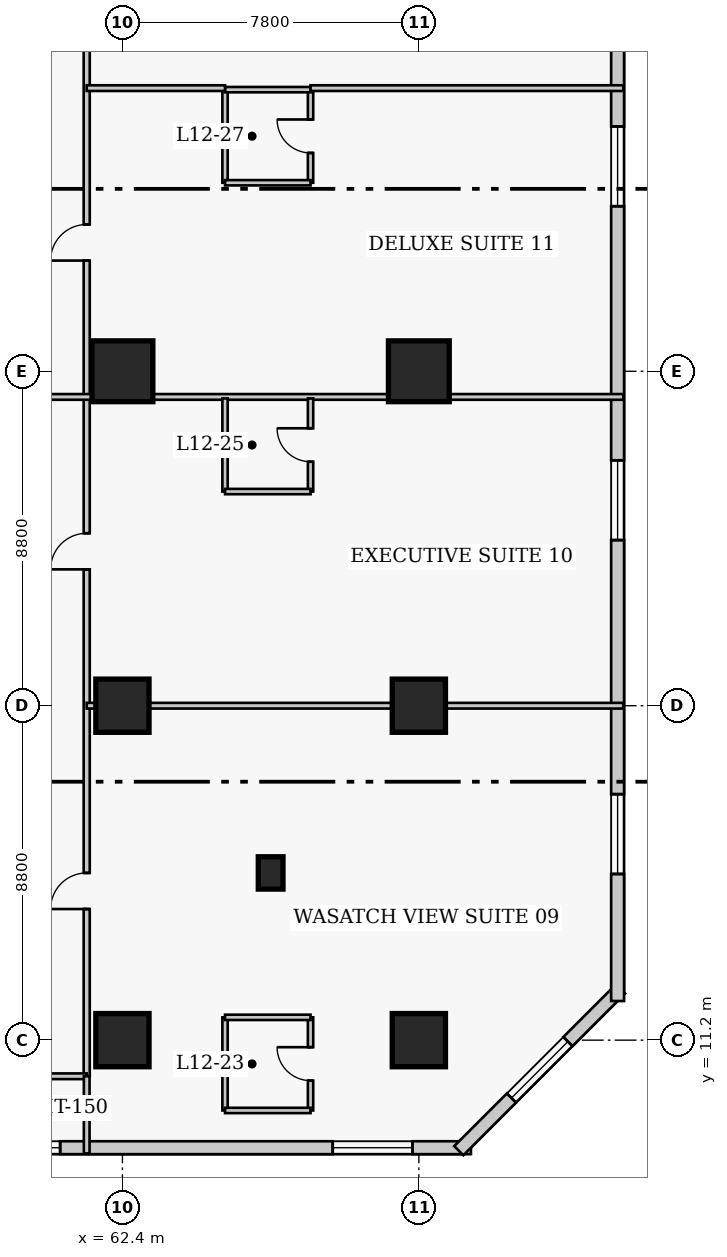
"""IFC4 building model, lengths in metres.
Left out: names, types, materials, properties, quantities, classifications, styles, units other than length and angle.
Written with IfcOpenShell. Run it as: python <this file> out.ifc"""

import sys

from ifc_helpers import new_model, si_unit, direction, frame, frame_2d, origin, origin_2d, place, context, subcontext, project, spatial, rectangle, extrude, element, fill, save


model = new_model("IFC4")
c1 = context("Model", 3, precision=1e-05, world=origin(), true_north=direction((0.0, 1.0)))
c2 = subcontext(c1, "Body", "Model", "MODEL_VIEW")
j1 = project(units=[si_unit("LENGTHUNIT", "METRE"), si_unit("PLANEANGLEUNIT", "RADIAN")], contexts=[c1])
p1 = place(None, origin())
s1 = spatial("IfcSite", under=j1, at=p1, CompositionType="ELEMENT")
p2 = place(p1, origin())
s2 = spatial("IfcBuilding", under=s1, at=p2, CompositionType="ELEMENT")
p3 = place(p2, frame((0.0, 0.0, 52.6)))
s3 = spatial("IfcBuildingStorey", under=s2, at=p3, CompositionType="ELEMENT", Elevation=52.6)
for number, where, z_axis, x_axis in (
    (1, (62.4, 11.2, 0.0), (0.0, 0.0, 1.0), (1.0, 0.0, 0.0)),
    (2, (62.4, 20.0, 0.0), (0.0, 0.0, 1.0), (1.0, 0.0, 0.0)),
):
    element("IfcColumn", number, at=place(p3, frame(where, z_axis=z_axis, x_axis=x_axis)), inside=s3, PredefinedType="COLUMN", context=c2, shape_type="SweptSolid", body=[
        extrude(rectangle(XDim=1.4, YDim=1.4, at=origin_2d()), origin(), (0.0, 0.0, 1.0), 3.8),
    ])
p4 = place(p3, frame((62.4, 28.8, 0.0), z_axis=(0.0, 0.0, 1.0), x_axis=(1.0, 0.0, 0.0)))
e3 = element("IfcColumn", 3, at=p4, inside=s3, PredefinedType="COLUMN", context=c2, shape_type="SweptSolid", body=[
    extrude(rectangle(XDim=1.6, YDim=1.6, at=origin_2d()), origin(), (0.0, 0.0, 1.0), 3.8),
])
for number, where, z_axis, x_axis in (
    (4, (70.2, 11.2, 0.0), (0.0, 0.0, 1.0), (1.0, 0.0, 0.0)),
    (5, (70.2, 20.0, 0.0), (0.0, 0.0, 1.0), (1.0, 0.0, 0.0)),
):
    element("IfcColumn", number, at=place(p3, frame(where, z_axis=z_axis, x_axis=x_axis)), inside=s3, PredefinedType="COLUMN", context=c2, shape_type="SweptSolid", body=[
        extrude(rectangle(XDim=1.4, YDim=1.4, at=origin_2d()), origin(), (0.0, 0.0, 1.0), 3.8),
    ])
p5 = place(p3, frame((70.2, 28.8, 0.0), z_axis=(0.0, 0.0, 1.0), x_axis=(1.0, 0.0, 0.0)))
e6 = element("IfcColumn", 6, at=p5, inside=s3, PredefinedType="COLUMN", context=c2, shape_type="SweptSolid", body=[
    extrude(rectangle(XDim=1.6, YDim=1.6, at=origin_2d()), origin(), (0.0, 0.0, 1.0), 3.8),
])
p6 = place(p3, frame((66.3, 15.6, 0.0), z_axis=(0.0, 0.0, 1.0), x_axis=(1.0, 0.0, 0.0)))
e7 = element("IfcColumn", 7, at=p6, inside=s3, PredefinedType="PILASTER", context=c2, shape_type="SweptSolid", body=[
    extrude(rectangle(XDim=0.65, YDim=0.85, at=origin_2d()), origin(), (0.0, 0.0, 1.0), 3.8),
])
p7 = place(p3, frame((41.68, 8.37, 0.0), z_axis=(0.0, 0.0, 1.0), x_axis=(1.0, 0.0, 0.0)))
e8 = element("IfcWall", 8, at=p7, inside=s3, PredefinedType="SOLIDWALL", context=c2, shape_type="SweptSolid", body=[
    extrude(rectangle(XDim=29.89, YDim=0.34, at=frame_2d((14.945, 0.0))), origin(), (0.0, 0.0, 1.0), 3.54),
])
p8 = place(p7, frame((2.036, 0.0, 0.85)))
e9 = element("IfcOpeningElement", 9, at=p8, cuts=e8, PredefinedType="OPENING", context=c2, shape_type="SweptSolid", body=[
    extrude(rectangle(XDim=2.1, YDim=1.85, at=frame_2d((1.05, 0.925))), frame((0.0, 0.18, 0.0), z_axis=(0.0, -1.0, 0.0), x_axis=(1.0, 0.0, 0.0)), (0.0, 0.0, 1.0), 0.36),
])
p9 = place(p7, frame((9.509, 0.0, 0.85)))
e10 = element("IfcOpeningElement", 10, at=p9, cuts=e8, PredefinedType="OPENING", context=c2, shape_type="SweptSolid", body=[
    extrude(rectangle(XDim=2.1, YDim=1.85, at=frame_2d((1.05, 0.925))), frame((0.0, 0.18, 0.0), z_axis=(0.0, -1.0, 0.0), x_axis=(1.0, 0.0, 0.0)), (0.0, 0.0, 1.0), 0.36),
])
p10 = place(p7, frame((16.981, 0.0, 0.85)))
e11 = element("IfcOpeningElement", 11, at=p10, cuts=e8, PredefinedType="OPENING", context=c2, shape_type="SweptSolid", body=[
    extrude(rectangle(XDim=2.1, YDim=1.85, at=frame_2d((1.05, 0.925))), frame((0.0, 0.18, 0.0), z_axis=(0.0, -1.0, 0.0), x_axis=(1.0, 0.0, 0.0)), (0.0, 0.0, 1.0), 0.36),
])
p11 = place(p7, frame((26.254, 0.0, 0.85)))
e12 = element("IfcOpeningElement", 12, at=p11, cuts=e8, PredefinedType="OPENING", context=c2, shape_type="SweptSolid", body=[
    extrude(rectangle(XDim=2.1, YDim=1.85, at=frame_2d((1.05, 0.925))), frame((0.0, 0.18, 0.0), z_axis=(0.0, -1.0, 0.0), x_axis=(1.0, 0.0, 0.0)), (0.0, 0.0, 1.0), 0.36),
])
p12 = place(p7, frame((14.265, 0.0, 0.85)))
e13 = element("IfcOpeningElement", 13, at=p12, cuts=e8, PredefinedType="OPENING", context=c2, shape_type="SweptSolid", body=[
    extrude(rectangle(XDim=1.3, YDim=1.7, at=frame_2d((0.65, 0.85))), frame((0.0, 0.18, 0.0), z_axis=(0.0, -1.0, 0.0), x_axis=(1.0, 0.0, 0.0)), (0.0, 0.0, 1.0), 0.36),
])
p13 = place(p3, frame((71.251, 8.292, 0.0), z_axis=(0.0, 0.0, 1.0), x_axis=(0.707106781187, 0.707106781187, 0.0)))
e14 = element("IfcWall", 14, at=p13, inside=s3, PredefinedType="SOLIDWALL", context=c2, shape_type="SweptSolid", body=[
    extrude(rectangle(XDim=6.02, YDim=0.34, at=frame_2d((3.01, 0.0))), origin(), (0.0, 0.0, 1.0), 3.54),
])
p14 = place(p13, frame((1.96, 0.0, 0.85)))
e15 = element("IfcOpeningElement", 15, at=p14, cuts=e14, PredefinedType="OPENING", context=c2, shape_type="SweptSolid", body=[
    extrude(rectangle(XDim=2.1, YDim=1.85, at=frame_2d((1.05, 0.925))), frame((0.0, 0.18, 0.0), z_axis=(0.0, -1.0, 0.0), x_axis=(1.0, 0.0, 0.0)), (0.0, 0.0, 1.0), 0.36),
])
p15 = place(p3, frame((75.43, 12.23, 0.0), z_axis=(0.0, 0.0, 1.0), x_axis=(0.0, 1.0, 0.0)))
e16 = element("IfcWall", 16, at=p15, inside=s3, PredefinedType="SOLIDWALL", context=c2, shape_type="SweptSolid", body=[
    extrude(rectangle(XDim=35.14, YDim=0.34, at=frame_2d((17.57, 0.0))), origin(), (0.0, 0.0, 1.0), 3.54),
])
p16 = place(p15, frame((3.343, 0.0, 0.85)))
e17 = element("IfcOpeningElement", 17, at=p16, cuts=e16, PredefinedType="OPENING", context=c2, shape_type="SweptSolid", body=[
    extrude(rectangle(XDim=2.1, YDim=1.85, at=frame_2d((1.05, 0.925))), frame((0.0, 0.18, 0.0), z_axis=(0.0, -1.0, 0.0), x_axis=(1.0, 0.0, 0.0)), (0.0, 0.0, 1.0), 0.36),
])
p17 = place(p15, frame((12.127, 0.0, 0.85)))
e18 = element("IfcOpeningElement", 18, at=p17, cuts=e16, PredefinedType="OPENING", context=c2, shape_type="SweptSolid", body=[
    extrude(rectangle(XDim=2.1, YDim=1.85, at=frame_2d((1.05, 0.925))), frame((0.0, 0.18, 0.0), z_axis=(0.0, -1.0, 0.0), x_axis=(1.0, 0.0, 0.0)), (0.0, 0.0, 1.0), 0.36),
])
p18 = place(p15, frame((20.913, 0.0, 0.85)))
e19 = element("IfcOpeningElement", 19, at=p18, cuts=e16, PredefinedType="OPENING", context=c2, shape_type="SweptSolid", body=[
    extrude(rectangle(XDim=2.1, YDim=1.85, at=frame_2d((1.05, 0.925))), frame((0.0, 0.18, 0.0), z_axis=(0.0, -1.0, 0.0), x_axis=(1.0, 0.0, 0.0)), (0.0, 0.0, 1.0), 0.36),
])
p19 = place(p15, frame((29.698, 0.0, 0.85)))
e20 = element("IfcOpeningElement", 20, at=p19, cuts=e16, PredefinedType="OPENING", context=c2, shape_type="SweptSolid", body=[
    extrude(rectangle(XDim=2.1, YDim=1.85, at=frame_2d((1.05, 0.925))), frame((0.0, 0.18, 0.0), z_axis=(0.0, -1.0, 0.0), x_axis=(1.0, 0.0, 0.0)), (0.0, 0.0, 1.0), 0.36),
])
p20 = place(p3, frame((61.46, 10.25, 0.0), z_axis=(0.0, 0.0, 1.0), x_axis=(0.0, 1.0, 0.0)))
e21 = element("IfcWall", 21, at=p20, inside=s3, PredefinedType="PARTITIONING", context=c2, shape_type="SweptSolid", body=[
    extrude(rectangle(XDim=30.4, YDim=0.16, at=frame_2d((15.2, 0.0))), origin(), (0.0, 0.0, 1.0), 3.54),
])
p21 = place(p20, frame((4.4, 0.0, 0.0)))
e22 = element("IfcOpeningElement", 22, at=p21, cuts=e21, PredefinedType="OPENING", context=c2, shape_type="SweptSolid", body=[
    extrude(rectangle(XDim=0.95, YDim=2.1, at=frame_2d((0.475, 1.05))), frame((0.0, 0.09, 0.0), z_axis=(0.0, -1.0, 0.0), x_axis=(1.0, 0.0, 0.0)), (0.0, 0.0, 1.0), 0.18),
])
p22 = place(p20, frame((13.337, 0.0, 0.0)))
e23 = element("IfcOpeningElement", 23, at=p22, cuts=e21, PredefinedType="OPENING", context=c2, shape_type="SweptSolid", body=[
    extrude(rectangle(XDim=0.95, YDim=2.1, at=frame_2d((0.475, 1.05))), frame((0.0, 0.09, 0.0), z_axis=(0.0, -1.0, 0.0), x_axis=(1.0, 0.0, 0.0)), (0.0, 0.0, 1.0), 0.18),
])
p23 = place(p20, frame((21.462, 0.0, 0.0)))
e24 = element("IfcOpeningElement", 24, at=p23, cuts=e21, PredefinedType="OPENING", context=c2, shape_type="SweptSolid", body=[
    extrude(rectangle(XDim=0.95, YDim=2.1, at=frame_2d((0.475, 1.05))), frame((0.0, 0.09, 0.0), z_axis=(0.0, -1.0, 0.0), x_axis=(1.0, 0.0, 0.0)), (0.0, 0.0, 1.0), 0.18),
])
p24 = place(p20, frame((28.96, 0.0, 0.0)))
e25 = element("IfcOpeningElement", 25, at=p24, cuts=e21, PredefinedType="OPENING", context=c2, shape_type="SweptSolid", body=[
    extrude(rectangle(XDim=1.0, YDim=2.15, at=frame_2d((0.5, 1.075))), frame((0.0, 0.09, 0.0), z_axis=(0.0, -1.0, 0.0), x_axis=(1.0, 0.0, 0.0)), (0.0, 0.0, 1.0), 0.18),
])
p25 = place(p3, frame((59.24, 10.25, 0.0), z_axis=(0.0, 0.0, 1.0), x_axis=(1.0, 0.0, 0.0)))
e26 = element("IfcWall", 26, at=p25, inside=s3, PredefinedType="PARTITIONING", context=c2, shape_type="SweptSolid", body=[
    extrude(rectangle(XDim=2.22, YDim=0.15, at=frame_2d((1.11, 0.0))), origin(), (0.0, 0.0, 1.0), 3.54),
])
p26 = place(p3, frame((61.46, 8.22, 0.0), z_axis=(0.0, 0.0, 1.0), x_axis=(0.0, 1.0, 0.0)))
e27 = element("IfcWall", 27, at=p26, inside=s3, PredefinedType="PARTITIONING", context=c2, shape_type="SweptSolid", body=[
    extrude(rectangle(XDim=2.03, YDim=0.15, at=frame_2d((1.015, 0.0))), origin(), (0.0, 0.0, 1.0), 3.54),
])
p27 = place(p3, frame((65.1, 9.35, 0.0), z_axis=(0.0, 0.0, 1.0), x_axis=(0.0, 1.0, 0.0)))
e28 = element("IfcWall", 28, at=p27, inside=s3, PredefinedType="PLUMBINGWALL", context=c2, shape_type="SweptSolid", body=[
    extrude(rectangle(XDim=2.45, YDim=0.14, at=frame_2d((1.225, 0.0))), origin(), (0.0, 0.0, 1.0), 3.54),
])
p28 = place(p3, frame((67.35, 9.35, 0.0), z_axis=(0.0, 0.0, 1.0), x_axis=(0.0, 1.0, 0.0)))
e29 = element("IfcWall", 29, at=p28, inside=s3, PredefinedType="PLUMBINGWALL", context=c2, shape_type="SweptSolid", body=[
    extrude(rectangle(XDim=2.45, YDim=0.14, at=frame_2d((1.225, 0.0))), origin(), (0.0, 0.0, 1.0), 3.54),
])
p29 = place(p28, frame((0.785, 0.0, 0.0)))
e30 = element("IfcOpeningElement", 30, at=p29, cuts=e29, PredefinedType="OPENING", context=c2, shape_type="SweptSolid", body=[
    extrude(rectangle(XDim=0.88, YDim=2.05, at=frame_2d((0.44, 1.025))), frame((0.0, 0.08, 0.0), z_axis=(0.0, -1.0, 0.0), x_axis=(1.0, 0.0, 0.0)), (0.0, 0.0, 1.0), 0.16),
])
for number, where, z_axis, x_axis in (
    (31, (65.1, 9.35, 0.0), (0.0, 0.0, 1.0), (1.0, 0.0, 0.0)),
    (32, (65.1, 11.8, 0.0), (0.0, 0.0, 1.0), (1.0, 0.0, 0.0)),
):
    element("IfcWall", number, at=place(p3, frame(where, z_axis=z_axis, x_axis=x_axis)), inside=s3, PredefinedType="PLUMBINGWALL", context=c2, shape_type="SweptSolid", body=[
        extrude(rectangle(XDim=2.25, YDim=0.14, at=frame_2d((1.125, 0.0))), origin(), (0.0, 0.0, 1.0), 3.54),
    ])
p30 = place(p3, frame((61.46, 20.0, 0.0), z_axis=(0.0, 0.0, 1.0), x_axis=(1.0, 0.0, 0.0)))
e33 = element("IfcWall", 33, at=p30, inside=s3, PredefinedType="PARTITIONING", context=c2, shape_type="SweptSolid", body=[
    extrude(rectangle(XDim=14.12, YDim=0.15, at=frame_2d((7.06, 0.0))), origin(), (0.0, 0.0, 1.0), 2.593),
])
p31 = place(p3, frame((59.51, 28.125, 0.0), z_axis=(0.0, 0.0, 1.0), x_axis=(1.0, 0.0, 0.0)))
e34 = element("IfcWall", 34, at=p31, inside=s3, PredefinedType="PARTITIONING", context=c2, shape_type="SweptSolid", body=[
    extrude(rectangle(XDim=16.07, YDim=0.15, at=frame_2d((8.035, 0.0))), origin(), (0.0, 0.0, 1.0), 3.54),
])
p32 = place(p3, frame((65.1, 25.635, 0.0), z_axis=(0.0, 0.0, 1.0), x_axis=(0.0, 1.0, 0.0)))
e35 = element("IfcWall", 35, at=p32, inside=s3, PredefinedType="PLUMBINGWALL", context=c2, shape_type="SweptSolid", body=[
    extrude(rectangle(XDim=2.45, YDim=0.14, at=frame_2d((1.225, 0.0))), origin(), (0.0, 0.0, 1.0), 3.54),
])
p33 = place(p3, frame((67.35, 25.635, 0.0), z_axis=(0.0, 0.0, 1.0), x_axis=(0.0, 1.0, 0.0)))
e36 = element("IfcWall", 36, at=p33, inside=s3, PredefinedType="PLUMBINGWALL", context=c2, shape_type="SweptSolid", body=[
    extrude(rectangle(XDim=2.45, YDim=0.14, at=frame_2d((1.225, 0.0))), origin(), (0.0, 0.0, 1.0), 3.54),
])
p34 = place(p33, frame((0.785, 0.0, 0.0)))
e37 = element("IfcOpeningElement", 37, at=p34, cuts=e36, PredefinedType="OPENING", context=c2, shape_type="SweptSolid", body=[
    extrude(rectangle(XDim=0.88, YDim=2.05, at=frame_2d((0.44, 1.025))), frame((0.0, 0.08, 0.0), z_axis=(0.0, -1.0, 0.0), x_axis=(1.0, 0.0, 0.0)), (0.0, 0.0, 1.0), 0.16),
])
p35 = place(p3, frame((65.1, 25.635, 0.0), z_axis=(0.0, 0.0, 1.0), x_axis=(1.0, 0.0, 0.0)))
e38 = element("IfcWall", 38, at=p35, inside=s3, PredefinedType="PLUMBINGWALL", context=c2, shape_type="SweptSolid", body=[
    extrude(rectangle(XDim=2.25, YDim=0.14, at=frame_2d((1.125, 0.0))), origin(), (0.0, 0.0, 1.0), 3.54),
])
p36 = place(p3, frame((65.1, 33.76, 0.0), z_axis=(0.0, 0.0, 1.0), x_axis=(0.0, 1.0, 0.0)))
e39 = element("IfcWall", 39, at=p36, inside=s3, PredefinedType="PLUMBINGWALL", context=c2, shape_type="SweptSolid", body=[
    extrude(rectangle(XDim=2.45, YDim=0.14, at=frame_2d((1.225, 0.0))), origin(), (0.0, 0.0, 1.0), 3.54),
])
p37 = place(p3, frame((67.35, 33.76, 0.0), z_axis=(0.0, 0.0, 1.0), x_axis=(0.0, 1.0, 0.0)))
e40 = element("IfcWall", 40, at=p37, inside=s3, PredefinedType="PLUMBINGWALL", context=c2, shape_type="SweptSolid", body=[
    extrude(rectangle(XDim=2.45, YDim=0.14, at=frame_2d((1.225, 0.0))), origin(), (0.0, 0.0, 1.0), 3.54),
])
p38 = place(p37, frame((0.785, 0.0, 0.0)))
e41 = element("IfcOpeningElement", 41, at=p38, cuts=e40, PredefinedType="OPENING", context=c2, shape_type="SweptSolid", body=[
    extrude(rectangle(XDim=0.88, YDim=2.05, at=frame_2d((0.44, 1.025))), frame((0.0, 0.08, 0.0), z_axis=(0.0, -1.0, 0.0), x_axis=(1.0, 0.0, 0.0)), (0.0, 0.0, 1.0), 0.16),
])
for number, where, z_axis, x_axis in (
    (42, (65.1, 33.76, 0.0), (0.0, 0.0, 1.0), (1.0, 0.0, 0.0)),
    (43, (65.1, 36.21, 0.0), (0.0, 0.0, 1.0), (1.0, 0.0, 0.0)),
):
    element("IfcWall", number, at=place(p3, frame(where, z_axis=z_axis, x_axis=x_axis)), inside=s3, PredefinedType="PLUMBINGWALL", context=c2, shape_type="SweptSolid", body=[
        extrude(rectangle(XDim=2.25, YDim=0.14, at=frame_2d((1.125, 0.0))), origin(), (0.0, 0.0, 1.0), 3.54),
    ])
p39 = place(p3, frame((61.46, 36.25, 0.0), z_axis=(0.0, 0.0, 1.0), x_axis=(1.0, 0.0, 0.0)))
e44 = element("IfcWall", 44, at=p39, inside=s3, PredefinedType="PARTITIONING", context=c2, shape_type="SweptSolid", body=[
    extrude(rectangle(XDim=3.64, YDim=0.15, at=frame_2d((1.82, 0.0))), origin(), (0.0, 0.0, 1.0), 3.54),
])
p40 = place(p3, frame((67.35, 36.25, 0.0), z_axis=(0.0, 0.0, 1.0), x_axis=(1.0, 0.0, 0.0)))
e45 = element("IfcWall", 45, at=p40, inside=s3, PredefinedType="PARTITIONING", context=c2, shape_type="SweptSolid", body=[
    extrude(rectangle(XDim=8.23, YDim=0.15, at=frame_2d((4.115, 0.0))), origin(), (0.0, 0.0, 1.0), 3.54),
])
p41 = place(p10, origin())
e46 = element("IfcWindow", 46, at=p41, inside=s3, PartitioningType="SINGLE_PANEL", PredefinedType="WINDOW", context=c2, shape_type="SweptSolid", body=[
    extrude(rectangle(XDim=2.1, YDim=1.85, at=frame_2d((1.05, 0.925))), frame((0.0, 0.03, 0.0), z_axis=(0.0, -1.0, 0.0), x_axis=(1.0, 0.0, 0.0)), (0.0, 0.0, 1.0), 0.06),
])
fill(e11, e46)
p42 = place(p11, origin())
e47 = element("IfcWindow", 47, at=p42, inside=s3, PartitioningType="SINGLE_PANEL", PredefinedType="WINDOW", context=c2, shape_type="SweptSolid", body=[
    extrude(rectangle(XDim=2.1, YDim=1.85, at=frame_2d((1.05, 0.925))), frame((0.0, 0.03, 0.0), z_axis=(0.0, -1.0, 0.0), x_axis=(1.0, 0.0, 0.0)), (0.0, 0.0, 1.0), 0.06),
])
fill(e12, e47)
p43 = place(p14, origin())
e48 = element("IfcWindow", 48, at=p43, inside=s3, PartitioningType="SINGLE_PANEL", PredefinedType="WINDOW", context=c2, shape_type="SweptSolid", body=[
    extrude(rectangle(XDim=2.1, YDim=1.85, at=frame_2d((1.05, 0.925))), frame((0.0, 0.03, 0.0), z_axis=(0.0, -1.0, 0.0), x_axis=(1.0, 0.0, 0.0)), (0.0, 0.0, 1.0), 0.06),
])
fill(e15, e48)
p44 = place(p16, origin())
e49 = element("IfcWindow", 49, at=p44, inside=s3, PartitioningType="SINGLE_PANEL", PredefinedType="WINDOW", context=c2, shape_type="SweptSolid", body=[
    extrude(rectangle(XDim=2.1, YDim=1.85, at=frame_2d((1.05, 0.925))), frame((0.0, 0.03, 0.0), z_axis=(0.0, -1.0, 0.0), x_axis=(1.0, 0.0, 0.0)), (0.0, 0.0, 1.0), 0.06),
])
fill(e17, e49)
p45 = place(p17, origin())
e50 = element("IfcWindow", 50, at=p45, inside=s3, PartitioningType="SINGLE_PANEL", PredefinedType="WINDOW", context=c2, shape_type="SweptSolid", body=[
    extrude(rectangle(XDim=2.1, YDim=1.85, at=frame_2d((1.05, 0.925))), frame((0.0, 0.03, 0.0), z_axis=(0.0, -1.0, 0.0), x_axis=(1.0, 0.0, 0.0)), (0.0, 0.0, 1.0), 0.06),
])
fill(e18, e50)
p46 = place(p18, origin())
e51 = element("IfcWindow", 51, at=p46, inside=s3, PartitioningType="SINGLE_PANEL", PredefinedType="WINDOW", context=c2, shape_type="SweptSolid", body=[
    extrude(rectangle(XDim=2.1, YDim=1.85, at=frame_2d((1.05, 0.925))), frame((0.0, 0.03, 0.0), z_axis=(0.0, -1.0, 0.0), x_axis=(1.0, 0.0, 0.0)), (0.0, 0.0, 1.0), 0.06),
])
fill(e19, e51)
p47 = place(p29, origin())
e52 = element("IfcDoor", 52, at=p47, inside=s3, OperationType="SINGLE_SWING_RIGHT", PredefinedType="DOOR", context=c2, shape_type="SweptSolid", body=[
    extrude(rectangle(XDim=0.88, YDim=2.05, at=frame_2d((0.44, 1.025))), frame((0.0, 0.025, 0.0), z_axis=(0.0, -1.0, 0.0), x_axis=(1.0, 0.0, 0.0)), (0.0, 0.0, 1.0), 0.05),
])
fill(e30, e52)
p48 = place(p21, origin())
e53 = element("IfcDoor", 53, at=p48, inside=s3, OperationType="SINGLE_SWING_LEFT", PredefinedType="DOOR", context=c2, shape_type="SweptSolid", body=[
    extrude(rectangle(XDim=0.95, YDim=2.1, at=frame_2d((0.475, 1.05))), frame((0.0, 0.025, 0.0), z_axis=(0.0, -1.0, 0.0), x_axis=(1.0, 0.0, 0.0)), (0.0, 0.0, 1.0), 0.05),
])
fill(e22, e53)
p49 = place(p34, origin())
e54 = element("IfcDoor", 54, at=p49, inside=s3, OperationType="SINGLE_SWING_RIGHT", PredefinedType="DOOR", context=c2, shape_type="SweptSolid", body=[
    extrude(rectangle(XDim=0.88, YDim=2.05, at=frame_2d((0.44, 1.025))), frame((0.0, 0.025, 0.0), z_axis=(0.0, -1.0, 0.0), x_axis=(1.0, 0.0, 0.0)), (0.0, 0.0, 1.0), 0.05),
])
fill(e37, e54)
p50 = place(p22, origin())
e55 = element("IfcDoor", 55, at=p50, inside=s3, OperationType="SINGLE_SWING_LEFT", PredefinedType="DOOR", context=c2, shape_type="SweptSolid", body=[
    extrude(rectangle(XDim=0.95, YDim=2.1, at=frame_2d((0.475, 1.05))), frame((0.0, 0.025, 0.0), z_axis=(0.0, -1.0, 0.0), x_axis=(1.0, 0.0, 0.0)), (0.0, 0.0, 1.0), 0.05),
])
fill(e23, e55)
p51 = place(p38, origin())
e56 = element("IfcDoor", 56, at=p51, inside=s3, OperationType="SINGLE_SWING_RIGHT", PredefinedType="DOOR", context=c2, shape_type="SweptSolid", body=[
    extrude(rectangle(XDim=0.88, YDim=2.05, at=frame_2d((0.44, 1.025))), frame((0.0, 0.025, 0.0), z_axis=(0.0, -1.0, 0.0), x_axis=(1.0, 0.0, 0.0)), (0.0, 0.0, 1.0), 0.05),
])
fill(e41, e56)
p52 = place(p23, origin())
e57 = element("IfcDoor", 57, at=p52, inside=s3, OperationType="SINGLE_SWING_LEFT", PredefinedType="DOOR", context=c2, shape_type="SweptSolid", body=[
    extrude(rectangle(XDim=0.95, YDim=2.1, at=frame_2d((0.475, 1.05))), frame((0.0, 0.025, 0.0), z_axis=(0.0, -1.0, 0.0), x_axis=(1.0, 0.0, 0.0)), (0.0, 0.0, 1.0), 0.05),
])
fill(e24, e57)
save(model, sys.argv[1])
